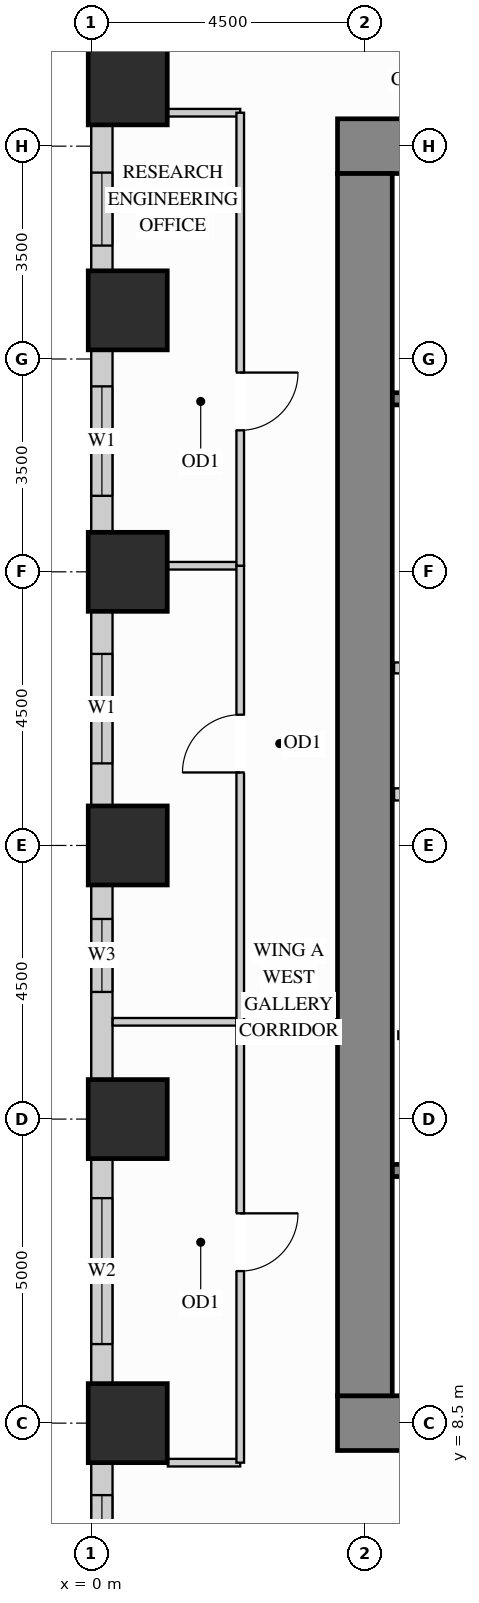
"""IFC4 building model, lengths in metres.
Left out: names, types, materials, properties, quantities, classifications, styles, units other than length and angle.
Written with IfcOpenShell. Run it as: python <this file> out.ifc"""

import sys

from ifc_helpers import new_model, si_unit, direction, frame, frame_2d, origin, origin_2d, place, context, subcontext, project, spatial, rectangle, extrude, source, transform, mapped, element, fill, save


model = new_model("IFC4")
c1 = context("Model", 3, precision=1e-05, world=origin(), true_north=direction((0.0, 1.0)))
c2 = subcontext(c1, "Body", "Model", "MODEL_VIEW")
j1 = project(units=[si_unit("LENGTHUNIT", "METRE"), si_unit("PLANEANGLEUNIT", "RADIAN")], contexts=[c1])
p1 = place(None, origin())
s1 = spatial("IfcSite", under=j1, at=p1, CompositionType="ELEMENT")
p2 = place(p1, origin())
s2 = spatial("IfcBuilding", under=s1, at=p2, CompositionType="ELEMENT")
p3 = place(p2, frame((0.0, 0.0, 58.5)))
s3 = spatial("IfcBuildingStorey", under=s2, at=p3, CompositionType="ELEMENT", Elevation=58.5)
m1 = source(origin(), c2, "Body", "SweptSolid", [
    extrude(rectangle(XDim=1.3, YDim=1.3, at=origin_2d()), origin(), (0.0, 0.0, 1.0), 3.38),
])
for number, where, z_axis, x_axis in (
    (1, (0.6, 13.5, 0.0), (0.0, 0.0, 1.0), (1.0, 0.0, 0.0)),
    (2, (0.6, 18.0, 0.0), (0.0, 0.0, 1.0), (1.0, 0.0, 0.0)),
    (3, (0.6, 22.5, 0.0), (0.0, 0.0, 1.0), (1.0, 0.0, 0.0)),
    (4, (0.6, 26.8, 0.0), (0.0, 0.0, 1.0), (1.0, 0.0, 0.0)),
    (5, (0.6, 30.5, 0.0), (0.0, 0.0, 1.0), (1.0, 0.0, 0.0)),
    (6, (0.6, 8.5, 0.0), (0.0, 0.0, 1.0), (1.0, 0.0, 0.0)),
):
    element("IfcColumn", number, at=place(p3, frame(where, z_axis=z_axis, x_axis=x_axis)), inside=s3, PredefinedType="COLUMN", context=c2, shape_type="MappedRepresentation", body=[
        mapped(m1, transform((0.0, 0.0, 0.0), x_axis=(1.0, 0.0, 0.0), y_axis=(0.0, 1.0, 0.0), z_axis=(0.0, 0.0, 1.0))),
    ])
m2 = source(origin(), c2, "Body", "SweptSolid", [
    extrude(rectangle(XDim=10.9, YDim=0.9, at=frame_2d((5.45, 0.0))), origin(), (0.0, 0.0, 1.0), 3.38),
])
for number, where, z_axis, x_axis in (
    (7, (4.05, 29.5, 0.0), (0.0, 0.0, 1.0), (1.0, 0.0, 0.0)),
    (8, (4.05, 8.5, 0.0), (0.0, 0.0, 1.0), (1.0, 0.0, 0.0)),
):
    element("IfcWall", number, at=place(p3, frame(where, z_axis=z_axis, x_axis=x_axis)), inside=s3, PredefinedType="SHEAR", context=c2, shape_type="MappedRepresentation", body=[
        mapped(m2, transform((0.0, 0.0, 0.0), x_axis=(1.0, 0.0, 0.0), y_axis=(0.0, 1.0, 0.0), z_axis=(0.0, 0.0, 1.0))),
    ])
m3 = source(origin(), c2, "Body", "SweptSolid", [
    extrude(rectangle(XDim=20.1, YDim=0.9, at=frame_2d((10.05, 0.0))), origin(), (0.0, 0.0, 1.0), 3.38),
])
p4 = place(p3, frame((4.5, 8.95, 0.0), z_axis=(0.0, 0.0, 1.0), x_axis=(0.0, 1.0, 0.0)))
e9 = element("IfcWall", 9, at=p4, inside=s3, PredefinedType="SHEAR", context=c2, shape_type="MappedRepresentation", body=[
    mapped(m3, transform((0.0, 0.0, 0.0), x_axis=(1.0, 0.0, 0.0), y_axis=(0.0, 1.0, 0.0), z_axis=(0.0, 0.0, 1.0))),
])
p5 = place(p3, frame((0.175, 29.852, 0.0), z_axis=(0.0, 0.0, 1.0), x_axis=(0.0, -1.0, 0.0)))
e10 = element("IfcWall", 10, at=p5, inside=s3, PredefinedType="SOLIDWALL", context=c2, shape_type="SweptSolid", body=[
    extrude(rectangle(XDim=2.404, YDim=0.35, at=frame_2d((1.202, 0.0))), origin(), (0.0, 0.0, 1.0), 2.51),
])
p6 = place(p5, frame((0.787, 0.0, 0.78)))
e11 = element("IfcOpeningElement", 11, at=p6, cuts=e10, PredefinedType="OPENING", context=c2, shape_type="SweptSolid", body=[
    extrude(rectangle(XDim=1.2, YDim=1.55, at=frame_2d((0.6, 0.775))), frame((0.0, 0.185, 0.0), z_axis=(0.0, -1.0, 0.0), x_axis=(1.0, 0.0, 0.0)), (0.0, 0.0, 1.0), 0.37),
])
p7 = place(p3, frame((0.175, 26.152, 0.0), z_axis=(0.0, 0.0, 1.0), x_axis=(0.0, -1.0, 0.0)))
e12 = element("IfcWall", 12, at=p7, inside=s3, PredefinedType="SOLIDWALL", context=c2, shape_type="SweptSolid", body=[
    extrude(rectangle(XDim=3.004, YDim=0.35, at=frame_2d((1.502, 0.0))), origin(), (0.0, 0.0, 1.0), 2.51),
])
p8 = place(p7, frame((0.602, 0.0, 0.78)))
e13 = element("IfcOpeningElement", 13, at=p8, cuts=e12, PredefinedType="OPENING", context=c2, shape_type="SweptSolid", body=[
    extrude(rectangle(XDim=1.8, YDim=1.55, at=frame_2d((0.9, 0.775))), frame((0.0, 0.185, 0.0), z_axis=(0.0, -1.0, 0.0), x_axis=(1.0, 0.0, 0.0)), (0.0, 0.0, 1.0), 0.37),
])
p9 = place(p3, frame((0.175, 21.852, 0.0), z_axis=(0.0, 0.0, 1.0), x_axis=(0.0, -1.0, 0.0)))
e14 = element("IfcWall", 14, at=p9, inside=s3, PredefinedType="SOLIDWALL", context=c2, shape_type="SweptSolid", body=[
    extrude(rectangle(XDim=3.204, YDim=0.35, at=frame_2d((1.602, 0.0))), origin(), (0.0, 0.0, 1.0), 2.51),
])
p10 = place(p9, frame((0.702, 0.0, 0.78)))
e15 = element("IfcOpeningElement", 15, at=p10, cuts=e14, PredefinedType="OPENING", context=c2, shape_type="SweptSolid", body=[
    extrude(rectangle(XDim=1.8, YDim=1.55, at=frame_2d((0.9, 0.775))), frame((0.0, 0.185, 0.0), z_axis=(0.0, -1.0, 0.0), x_axis=(1.0, 0.0, 0.0)), (0.0, 0.0, 1.0), 0.37),
])
p11 = place(p3, frame((0.175, 17.352, 0.0), z_axis=(0.0, 0.0, 1.0), x_axis=(0.0, -1.0, 0.0)))
e16 = element("IfcWall", 16, at=p11, inside=s3, PredefinedType="SOLIDWALL", context=c2, shape_type="SweptSolid", body=[
    extrude(rectangle(XDim=3.204, YDim=0.35, at=frame_2d((1.602, 0.0))), origin(), (0.0, 0.0, 1.0), 2.51),
])
p12 = place(p11, frame((0.561, 0.0, 0.78)))
e17 = element("IfcOpeningElement", 17, at=p12, cuts=e16, PredefinedType="OPENING", context=c2, shape_type="SweptSolid", body=[
    extrude(rectangle(XDim=1.2, YDim=1.55, at=frame_2d((0.6, 0.775))), frame((0.0, 0.185, 0.0), z_axis=(0.0, -1.0, 0.0), x_axis=(1.0, 0.0, 0.0)), (0.0, 0.0, 1.0), 0.37),
])
p13 = place(p3, frame((0.175, 12.852, 0.0), z_axis=(0.0, 0.0, 1.0), x_axis=(0.0, -1.0, 0.0)))
e18 = element("IfcWall", 18, at=p13, inside=s3, PredefinedType="SOLIDWALL", context=c2, shape_type="SweptSolid", body=[
    extrude(rectangle(XDim=3.704, YDim=0.35, at=frame_2d((1.852, 0.0))), origin(), (0.0, 0.0, 1.0), 2.51),
])
p14 = place(p13, frame((0.652, 0.0, 0.78)))
e19 = element("IfcOpeningElement", 19, at=p14, cuts=e18, PredefinedType="OPENING", context=c2, shape_type="SweptSolid", body=[
    extrude(rectangle(XDim=2.4, YDim=1.55, at=frame_2d((1.2, 0.775))), frame((0.0, 0.185, 0.0), z_axis=(0.0, -1.0, 0.0), x_axis=(1.0, 0.0, 0.0)), (0.0, 0.0, 1.0), 0.37),
])
p15 = place(p3, frame((0.175, 7.852, 0.0), z_axis=(0.0, 0.0, 1.0), x_axis=(0.0, -1.0, 0.0)))
e20 = element("IfcWall", 20, at=p15, inside=s3, PredefinedType="SOLIDWALL", context=c2, shape_type="SweptSolid", body=[
    extrude(rectangle(XDim=3.704, YDim=0.35, at=frame_2d((1.852, 0.0))), origin(), (0.0, 0.0, 1.0), 2.51),
])
p16 = place(p15, frame((0.536, 0.0, 0.78)))
e21 = element("IfcOpeningElement", 21, at=p16, cuts=e20, PredefinedType="OPENING", context=c2, shape_type="SweptSolid", body=[
    extrude(rectangle(XDim=1.2, YDim=1.55, at=frame_2d((0.6, 0.775))), frame((0.0, 0.185, 0.0), z_axis=(0.0, -1.0, 0.0), x_axis=(1.0, 0.0, 0.0)), (0.0, 0.0, 1.0), 0.37),
])
m4 = source(origin(), c2, "Body", "SweptSolid", [
    extrude(rectangle(XDim=2.17, YDim=0.18, at=frame_2d((1.085, 0.0))), origin(), (0.0, 0.0, 1.0), 3.365),
])
p17 = place(p3, frame((4.98, 20.92, 0.0), z_axis=(0.0, 0.0, 1.0), x_axis=(1.0, 0.0, 0.0)))
e22 = element("IfcWall", 22, at=p17, inside=s3, PredefinedType="PARTITIONING", context=c2, shape_type="MappedRepresentation", body=[
    mapped(m4, transform((0.0, 0.0, 0.0), x_axis=(1.0, 0.0, 0.0), y_axis=(0.0, 1.0, 0.0), z_axis=(0.0, 0.0, 1.0))),
])
p18 = place(p3, frame((5.05, 14.88, 0.0), z_axis=(0.0, 0.0, 1.0), x_axis=(1.0, 0.0, 0.0)))
e23 = element("IfcWall", 23, at=p18, inside=s3, PredefinedType="PARTITIONING", context=c2, shape_type="SweptSolid", body=[
    extrude(rectangle(XDim=2.35, YDim=0.125, at=frame_2d((1.175, 0.0))), origin(), (0.0, 0.0, 1.0), 3.365),
])
p19 = place(p18, frame((0.7, 0.0, 0.0)))
e24 = element("IfcOpeningElement", 24, at=p19, cuts=e23, PredefinedType="OPENING", context=c2, shape_type="SweptSolid", body=[
    extrude(rectangle(XDim=0.85, YDim=2.1, at=frame_2d((0.425, 1.05))), frame((0.0, 0.073, 0.0), z_axis=(0.0, -1.0, 0.0), x_axis=(1.0, 0.0, 0.0)), (0.0, 0.0, 1.0), 0.145),
])
m5 = source(origin(), c2, "Body", "SweptSolid", [
    extrude(rectangle(XDim=1.19, YDim=0.125, at=frame_2d((0.595, 0.0))), origin(), (0.0, 0.0, 1.0), 3.365),
])
for number, where, z_axis, x_axis in (
    (25, (1.26, 30.05, 0.0), (0.0, 0.0, 1.0), (1.0, 0.0, 0.0)),
    (26, (1.26, 7.85, 0.0), (0.0, 0.0, 1.0), (1.0, 0.0, 0.0)),
):
    element("IfcWall", number, at=place(p3, frame(where, z_axis=z_axis, x_axis=x_axis)), inside=s3, PredefinedType="PARTITIONING", context=c2, shape_type="MappedRepresentation", body=[
        mapped(m5, transform((0.0, 0.0, 0.0), x_axis=(1.0, 0.0, 0.0), y_axis=(0.0, 1.0, 0.0), z_axis=(0.0, 0.0, 1.0))),
    ])
m6 = source(origin(), c2, "Body", "SweptSolid", [
    extrude(rectangle(XDim=2.098, YDim=0.125, at=frame_2d((1.049, 0.0))), origin(), (0.0, 0.0, 1.0), 3.365),
])
p20 = place(p3, frame((0.352, 15.1, 0.0), z_axis=(0.0, 0.0, 1.0), x_axis=(1.0, 0.0, 0.0)))
e27 = element("IfcWall", 27, at=p20, inside=s3, PredefinedType="PARTITIONING", context=c2, shape_type="MappedRepresentation", body=[
    mapped(m6, transform((0.0, 0.0, 0.0), x_axis=(1.0, 0.0, 0.0), y_axis=(0.0, 1.0, 0.0), z_axis=(0.0, 0.0, 1.0))),
])
p21 = place(p3, frame((1.26, 22.6, 0.0), z_axis=(0.0, 0.0, 1.0), x_axis=(1.0, 0.0, 0.0)))
e28 = element("IfcWall", 28, at=p21, inside=s3, PredefinedType="PARTITIONING", context=c2, shape_type="MappedRepresentation", body=[
    mapped(m5, transform((0.0, 0.0, 0.0), x_axis=(1.0, 0.0, 0.0), y_axis=(0.0, 1.0, 0.0), z_axis=(0.0, 0.0, 1.0))),
])
p22 = place(p3, frame((2.45, 7.85, 0.0), z_axis=(0.0, 0.0, 1.0), x_axis=(0.0, 1.0, 0.0)))
e29 = element("IfcWall", 29, at=p22, inside=s3, PredefinedType="PARTITIONING", context=c2, shape_type="SweptSolid", body=[
    extrude(rectangle(XDim=7.25, YDim=0.125, at=frame_2d((3.625, 0.0))), origin(), (0.0, 0.0, 1.0), 3.365),
])
p23 = place(p22, frame((3.15, 0.0, 0.0)))
e30 = element("IfcOpeningElement", 30, at=p23, cuts=e29, PredefinedType="OPENING", context=c2, shape_type="SweptSolid", body=[
    extrude(rectangle(XDim=0.95, YDim=2.15, at=frame_2d((0.475, 1.075))), frame((0.0, 0.073, 0.0), z_axis=(0.0, -1.0, 0.0), x_axis=(1.0, 0.0, 0.0)), (0.0, 0.0, 1.0), 0.145),
])
p24 = place(p3, frame((2.45, 15.1, 0.0), z_axis=(0.0, 0.0, 1.0), x_axis=(0.0, 1.0, 0.0)))
e31 = element("IfcWall", 31, at=p24, inside=s3, PredefinedType="PARTITIONING", context=c2, shape_type="SweptSolid", body=[
    extrude(rectangle(XDim=7.5, YDim=0.125, at=frame_2d((3.75, 0.0))), origin(), (0.0, 0.0, 1.0), 3.365),
])
p25 = place(p24, frame((4.1, 0.0, 0.0)))
e32 = element("IfcOpeningElement", 32, at=p25, cuts=e31, PredefinedType="OPENING", context=c2, shape_type="SweptSolid", body=[
    extrude(rectangle(XDim=0.95, YDim=2.15, at=frame_2d((0.475, 1.075))), frame((0.0, 0.073, 0.0), z_axis=(0.0, -1.0, 0.0), x_axis=(1.0, 0.0, 0.0)), (0.0, 0.0, 1.0), 0.145),
])
p26 = place(p3, frame((2.45, 22.6, 0.0), z_axis=(0.0, 0.0, 1.0), x_axis=(0.0, 1.0, 0.0)))
e33 = element("IfcWall", 33, at=p26, inside=s3, PredefinedType="PARTITIONING", context=c2, shape_type="SweptSolid", body=[
    extrude(rectangle(XDim=7.45, YDim=0.125, at=frame_2d((3.725, 0.0))), origin(), (0.0, 0.0, 1.0), 3.365),
])
p27 = place(p26, frame((2.227, 0.0, 0.0)))
e34 = element("IfcOpeningElement", 34, at=p27, cuts=e33, PredefinedType="OPENING", context=c2, shape_type="SweptSolid", body=[
    extrude(rectangle(XDim=0.95, YDim=2.15, at=frame_2d((0.475, 1.075))), frame((0.0, 0.073, 0.0), z_axis=(0.0, -1.0, 0.0), x_axis=(1.0, 0.0, 0.0)), (0.0, 0.0, 1.0), 0.145),
])
m7 = source(origin(), c2, "Body", "SweptSolid", [
    extrude(rectangle(XDim=2.09, YDim=0.2, at=frame_2d((1.045, 0.0))), origin(), (0.0, 0.0, 1.0), 3.365),
])
p28 = place(p3, frame((4.98, 18.84, 0.0), z_axis=(0.0, 0.0, 1.0), x_axis=(1.0, 0.0, 0.0)))
e35 = element("IfcWall", 35, at=p28, inside=s3, PredefinedType="PARTITIONING", context=c2, shape_type="MappedRepresentation", body=[
    mapped(m7, transform((0.0, 0.0, 0.0), x_axis=(1.0, 0.0, 0.0), y_axis=(0.0, 1.0, 0.0), z_axis=(0.0, 0.0, 1.0))),
])
p29 = place(p3, frame((4.952, 12.655, 0.0), z_axis=(0.0, 0.0, 1.0), x_axis=(1.0, 0.0, 0.0)))
e36 = element("IfcWall", 36, at=p29, inside=s3, PredefinedType="SHEAR", context=c2, shape_type="SweptSolid", body=[
    extrude(rectangle(XDim=7.453, YDim=0.2, at=frame_2d((3.727, 0.0))), origin(), (0.0, 0.0, 1.0), 3.38),
])
p30 = place(p29, frame((0.4, 0.0, 0.0)))
e37 = element("IfcOpeningElement", 37, at=p30, cuts=e36, PredefinedType="OPENING", context=c2, shape_type="SweptSolid", body=[
    extrude(rectangle(XDim=1.1, YDim=2.15, at=frame_2d((0.55, 1.075))), frame((0.0, 0.11, 0.0), z_axis=(0.0, -1.0, 0.0), x_axis=(1.0, 0.0, 0.0)), (0.0, 0.0, 1.0), 0.22),
])
p31 = place(p3, frame((4.952, 25.345, 0.0), z_axis=(0.0, 0.0, 1.0), x_axis=(1.0, 0.0, 0.0)))
e38 = element("IfcWall", 38, at=p31, inside=s3, PredefinedType="SHEAR", context=c2, shape_type="SweptSolid", body=[
    extrude(rectangle(XDim=7.453, YDim=0.2, at=frame_2d((3.727, 0.0))), origin(), (0.0, 0.0, 1.0), 3.38),
])
p32 = place(p31, frame((0.4, 0.0, 0.0)))
e39 = element("IfcOpeningElement", 39, at=p32, cuts=e38, PredefinedType="OPENING", context=c2, shape_type="SweptSolid", body=[
    extrude(rectangle(XDim=1.1, YDim=2.15, at=frame_2d((0.55, 1.075))), frame((0.0, 0.11, 0.0), z_axis=(0.0, -1.0, 0.0), x_axis=(1.0, 0.0, 0.0)), (0.0, 0.0, 1.0), 0.22),
])
m8 = source(origin(), c2, "Body", "SweptSolid", [
    extrude(rectangle(XDim=0.95, YDim=2.15, at=frame_2d((0.475, 1.075))), frame((0.0, 0.025, 0.0), z_axis=(0.0, -1.0, 0.0), x_axis=(1.0, 0.0, 0.0)), (0.0, 0.0, 1.0), 0.05),
])
p33 = place(p23, origin())
e40 = element("IfcDoor", 40, at=p33, inside=s3, OperationType="SINGLE_SWING_RIGHT", PredefinedType="DOOR", context=c2, shape_type="MappedRepresentation", body=[
    mapped(m8, transform((0.0, 0.0, 0.0), x_axis=(1.0, 0.0, 0.0), y_axis=(0.0, 1.0, 0.0), z_axis=(0.0, 0.0, 1.0))),
])
fill(e30, e40)
p34 = place(p25, origin())
e41 = element("IfcDoor", 41, at=p34, inside=s3, OperationType="SINGLE_SWING_LEFT", PredefinedType="DOOR", context=c2, shape_type="MappedRepresentation", body=[
    mapped(m8, transform((0.0, 0.0, 0.0), x_axis=(1.0, 0.0, 0.0), y_axis=(0.0, 1.0, 0.0), z_axis=(0.0, 0.0, 1.0))),
])
fill(e32, e41)
p35 = place(p27, origin())
e42 = element("IfcDoor", 42, at=p35, inside=s3, OperationType="SINGLE_SWING_RIGHT", PredefinedType="DOOR", context=c2, shape_type="MappedRepresentation", body=[
    mapped(m8, transform((0.0, 0.0, 0.0), x_axis=(1.0, 0.0, 0.0), y_axis=(0.0, 1.0, 0.0), z_axis=(0.0, 0.0, 1.0))),
])
fill(e34, e42)
m9 = source(origin(), c2, "Body", "SweptSolid", [
    extrude(rectangle(XDim=1.8, YDim=1.55, at=frame_2d((0.9, 0.775))), frame((0.0, 0.03, 0.0), z_axis=(0.0, -1.0, 0.0), x_axis=(1.0, 0.0, 0.0)), (0.0, 0.0, 1.0), 0.06),
])
p36 = place(p8, origin())
e43 = element("IfcWindow", 43, at=p36, inside=s3, PartitioningType="SINGLE_PANEL", PredefinedType="WINDOW", context=c2, shape_type="MappedRepresentation", body=[
    mapped(m9, transform((0.0, 0.0, 0.0), x_axis=(1.0, 0.0, 0.0), y_axis=(0.0, 1.0, 0.0), z_axis=(0.0, 0.0, 1.0))),
])
fill(e13, e43)
p37 = place(p10, origin())
e44 = element("IfcWindow", 44, at=p37, inside=s3, PartitioningType="SINGLE_PANEL", PredefinedType="WINDOW", context=c2, shape_type="MappedRepresentation", body=[
    mapped(m9, transform((0.0, 0.0, 0.0), x_axis=(1.0, 0.0, 0.0), y_axis=(0.0, 1.0, 0.0), z_axis=(0.0, 0.0, 1.0))),
])
fill(e15, e44)
m10 = source(origin(), c2, "Body", "SweptSolid", [
    extrude(rectangle(XDim=2.4, YDim=1.55, at=frame_2d((1.2, 0.775))), frame((0.0, 0.03, 0.0), z_axis=(0.0, -1.0, 0.0), x_axis=(1.0, 0.0, 0.0)), (0.0, 0.0, 1.0), 0.06),
])
p38 = place(p14, origin())
e45 = element("IfcWindow", 45, at=p38, inside=s3, PartitioningType="SINGLE_PANEL", PredefinedType="WINDOW", context=c2, shape_type="MappedRepresentation", body=[
    mapped(m10, transform((0.0, 0.0, 0.0), x_axis=(1.0, 0.0, 0.0), y_axis=(0.0, 1.0, 0.0), z_axis=(0.0, 0.0, 1.0))),
])
fill(e19, e45)
m11 = source(origin(), c2, "Body", "SweptSolid", [
    extrude(rectangle(XDim=1.2, YDim=1.55, at=frame_2d((0.6, 0.775))), frame((0.0, 0.03, 0.0), z_axis=(0.0, -1.0, 0.0), x_axis=(1.0, 0.0, 0.0)), (0.0, 0.0, 1.0), 0.06),
])
p39 = place(p6, origin())
e46 = element("IfcWindow", 46, at=p39, inside=s3, PartitioningType="SINGLE_PANEL", PredefinedType="WINDOW", context=c2, shape_type="MappedRepresentation", body=[
    mapped(m11, transform((0.0, 0.0, 0.0), x_axis=(1.0, 0.0, 0.0), y_axis=(0.0, 1.0, 0.0), z_axis=(0.0, 0.0, 1.0))),
])
fill(e11, e46)
p40 = place(p12, origin())
e47 = element("IfcWindow", 47, at=p40, inside=s3, PartitioningType="SINGLE_PANEL", PredefinedType="WINDOW", context=c2, shape_type="MappedRepresentation", body=[
    mapped(m11, transform((0.0, 0.0, 0.0), x_axis=(1.0, 0.0, 0.0), y_axis=(0.0, 1.0, 0.0), z_axis=(0.0, 0.0, 1.0))),
])
fill(e17, e47)
p41 = place(p16, origin())
e48 = element("IfcWindow", 48, at=p41, inside=s3, PartitioningType="SINGLE_PANEL", PredefinedType="WINDOW", context=c2, shape_type="MappedRepresentation", body=[
    mapped(m11, transform((0.0, 0.0, 0.0), x_axis=(1.0, 0.0, 0.0), y_axis=(0.0, 1.0, 0.0), z_axis=(0.0, 0.0, 1.0))),
])
fill(e21, e48)
save(model, sys.argv[1])
